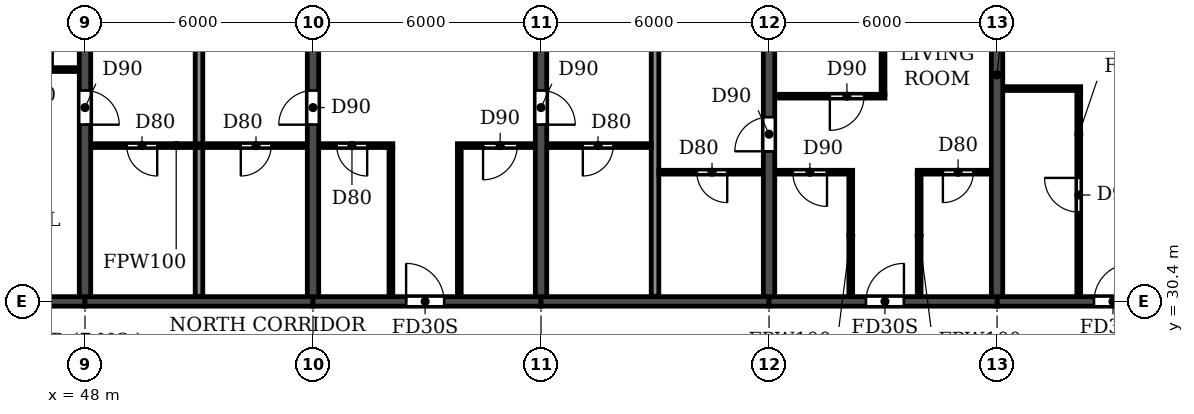
"""IFC4 building model, lengths in metres.
Left out: names, types, materials, properties, quantities, classifications, styles, units other than length and angle.
Written with IfcOpenShell. Run it as: python <this file> out.ifc"""

import sys

from ifc_helpers import new_model, si_unit, direction, frame, frame_2d, origin, place, context, subcontext, project, spatial, rectangle, extrude, element, fill, save


model = new_model("IFC4")
c1 = context("Model", 3, precision=1e-05, world=origin(), true_north=direction((0.0, 1.0)))
c2 = subcontext(c1, "Body", "Model", "MODEL_VIEW")
j1 = project(units=[si_unit("LENGTHUNIT", "METRE"), si_unit("PLANEANGLEUNIT", "RADIAN")], contexts=[c1])
p1 = place(None, origin())
s1 = spatial("IfcSite", under=j1, at=p1, CompositionType="ELEMENT")
p2 = place(p1, origin())
s2 = spatial("IfcBuilding", under=s1, at=p2, CompositionType="ELEMENT")
p3 = place(p2, frame((0.0, 0.0, 162.0)))
s3 = spatial("IfcBuildingStorey", under=s2, at=p3, CompositionType="ELEMENT", Elevation=162.0)
p4 = place(p3, frame((48.0, 30.525, 0.0), z_axis=(0.0, 0.0, 1.0), x_axis=(0.0, 1.0, 0.0)))
e1 = element("IfcWall", 1, at=p4, inside=s3, PredefinedType="SHEAR", context=c2, shape_type="SweptSolid", body=[
    extrude(rectangle(XDim=11.675, YDim=0.3, at=frame_2d((5.837, 0.0))), origin(), (0.0, 0.0, 1.0), 2.95),
])
p5 = place(p4, frame((4.525, 0.0, 0.0)))
e2 = element("IfcOpeningElement", 2, at=p5, cuts=e1, PredefinedType="OPENING", context=c2, shape_type="SweptSolid", body=[
    extrude(rectangle(XDim=0.9, YDim=2.1, at=frame_2d((0.45, 1.05))), frame((0.0, 0.16, 0.0), z_axis=(0.0, -1.0, 0.0), x_axis=(1.0, 0.0, 0.0)), (0.0, 0.0, 1.0), 0.32),
])
p6 = place(p3, frame((54.0, 30.525, 0.0), z_axis=(0.0, 0.0, 1.0), x_axis=(0.0, 1.0, 0.0)))
e3 = element("IfcWall", 3, at=p6, inside=s3, PredefinedType="SHEAR", context=c2, shape_type="SweptSolid", body=[
    extrude(rectangle(XDim=11.675, YDim=0.3, at=frame_2d((5.837, 0.0))), origin(), (0.0, 0.0, 1.0), 2.95),
])
p7 = place(p6, frame((4.525, 0.0, 0.0)))
e4 = element("IfcOpeningElement", 4, at=p7, cuts=e3, PredefinedType="OPENING", context=c2, shape_type="SweptSolid", body=[
    extrude(rectangle(XDim=0.9, YDim=2.1, at=frame_2d((0.45, 1.05))), frame((0.0, 0.16, 0.0), z_axis=(0.0, -1.0, 0.0), x_axis=(1.0, 0.0, 0.0)), (0.0, 0.0, 1.0), 0.32),
])
p8 = place(p3, frame((60.0, 30.525, 0.0), z_axis=(0.0, 0.0, 1.0), x_axis=(0.0, 1.0, 0.0)))
e5 = element("IfcWall", 5, at=p8, inside=s3, PredefinedType="SHEAR", context=c2, shape_type="SweptSolid", body=[
    extrude(rectangle(XDim=11.675, YDim=0.3, at=frame_2d((5.837, 0.0))), origin(), (0.0, 0.0, 1.0), 2.95),
])
p9 = place(p8, frame((4.525, 0.0, 0.0)))
e6 = element("IfcOpeningElement", 6, at=p9, cuts=e5, PredefinedType="OPENING", context=c2, shape_type="SweptSolid", body=[
    extrude(rectangle(XDim=0.9, YDim=2.1, at=frame_2d((0.45, 1.05))), frame((0.0, 0.16, 0.0), z_axis=(0.0, -1.0, 0.0), x_axis=(1.0, 0.0, 0.0)), (0.0, 0.0, 1.0), 0.32),
])
p10 = place(p3, frame((66.0, 30.525, 0.0), z_axis=(0.0, 0.0, 1.0), x_axis=(0.0, 1.0, 0.0)))
e7 = element("IfcWall", 7, at=p10, inside=s3, PredefinedType="SHEAR", context=c2, shape_type="SweptSolid", body=[
    extrude(rectangle(XDim=11.675, YDim=0.3, at=frame_2d((5.837, 0.0))), origin(), (0.0, 0.0, 1.0), 2.95),
])
p11 = place(p10, frame((3.825, 0.0, 0.0)))
e8 = element("IfcOpeningElement", 8, at=p11, cuts=e7, PredefinedType="OPENING", context=c2, shape_type="SweptSolid", body=[
    extrude(rectangle(XDim=0.9, YDim=2.1, at=frame_2d((0.45, 1.05))), frame((0.0, 0.16, 0.0), z_axis=(0.0, -1.0, 0.0), x_axis=(1.0, 0.0, 0.0)), (0.0, 0.0, 1.0), 0.32),
])
p12 = place(p3, frame((72.0, 30.525, 0.0), z_axis=(0.0, 0.0, 1.0), x_axis=(0.0, 1.0, 0.0)))
e9 = element("IfcWall", 9, at=p12, inside=s3, PredefinedType="SHEAR", context=c2, shape_type="SweptSolid", body=[
    extrude(rectangle(XDim=11.675, YDim=0.3, at=frame_2d((5.837, 0.0))), origin(), (0.0, 0.0, 1.0), 2.95),
])
for number, where, z_axis, x_axis in (
    (10, (42.0, 30.4, 0.0), (0.0, 0.0, 1.0), (1.0, 0.0, 0.0)),
    (11, (48.0, 30.4, 0.0), (0.0, 0.0, 1.0), (1.0, 0.0, 0.0)),
):
    element("IfcWall", number, at=place(p3, frame(where, z_axis=z_axis, x_axis=x_axis)), inside=s3, PredefinedType="SHEAR", context=c2, shape_type="SweptSolid", body=[
        extrude(rectangle(XDim=6.0, YDim=0.25, at=frame_2d((3.0, 0.0))), origin(), (0.0, 0.0, 1.0), 2.35),
    ])
p13 = place(p3, frame((54.0, 30.4, 0.0), z_axis=(0.0, 0.0, 1.0), x_axis=(1.0, 0.0, 0.0)))
e12 = element("IfcWall", 12, at=p13, inside=s3, PredefinedType="SHEAR", context=c2, shape_type="SweptSolid", body=[
    extrude(rectangle(XDim=6.0, YDim=0.25, at=frame_2d((3.0, 0.0))), origin(), (0.0, 0.0, 1.0), 2.35),
])
p14 = place(p13, frame((2.45, 0.0, 0.0)))
e13 = element("IfcOpeningElement", 13, at=p14, cuts=e12, PredefinedType="OPENING", context=c2, shape_type="SweptSolid", body=[
    extrude(rectangle(XDim=1.0, YDim=2.1, at=frame_2d((0.5, 1.05))), frame((0.0, 0.135, 0.0), z_axis=(0.0, -1.0, 0.0), x_axis=(1.0, 0.0, 0.0)), (0.0, 0.0, 1.0), 0.27),
])
p15 = place(p3, frame((60.0, 30.4, 0.0), z_axis=(0.0, 0.0, 1.0), x_axis=(1.0, 0.0, 0.0)))
e14 = element("IfcWall", 14, at=p15, inside=s3, PredefinedType="SHEAR", context=c2, shape_type="SweptSolid", body=[
    extrude(rectangle(XDim=6.0, YDim=0.25, at=frame_2d((3.0, 0.0))), origin(), (0.0, 0.0, 1.0), 2.35),
])
p16 = place(p3, frame((66.0, 30.4, 0.0), z_axis=(0.0, 0.0, 1.0), x_axis=(1.0, 0.0, 0.0)))
e15 = element("IfcWall", 15, at=p16, inside=s3, PredefinedType="SHEAR", context=c2, shape_type="SweptSolid", body=[
    extrude(rectangle(XDim=6.0, YDim=0.25, at=frame_2d((3.0, 0.0))), origin(), (0.0, 0.0, 1.0), 2.35),
])
p17 = place(p16, frame((2.55, 0.0, 0.0)))
e16 = element("IfcOpeningElement", 16, at=p17, cuts=e15, PredefinedType="OPENING", context=c2, shape_type="SweptSolid", body=[
    extrude(rectangle(XDim=1.0, YDim=2.1, at=frame_2d((0.5, 1.05))), frame((0.0, 0.135, 0.0), z_axis=(0.0, -1.0, 0.0), x_axis=(1.0, 0.0, 0.0)), (0.0, 0.0, 1.0), 0.27),
])
p18 = place(p3, frame((72.0, 30.4, 0.0), z_axis=(0.0, 0.0, 1.0), x_axis=(1.0, 0.0, 0.0)))
e17 = element("IfcWall", 17, at=p18, inside=s3, PredefinedType="SHEAR", context=c2, shape_type="SweptSolid", body=[
    extrude(rectangle(XDim=6.0, YDim=0.25, at=frame_2d((3.0, 0.0))), origin(), (0.0, 0.0, 1.0), 2.35),
])
p19 = place(p18, frame((2.55, 0.0, 0.0)))
e18 = element("IfcOpeningElement", 18, at=p19, cuts=e17, PredefinedType="OPENING", context=c2, shape_type="SweptSolid", body=[
    extrude(rectangle(XDim=1.0, YDim=2.1, at=frame_2d((0.5, 1.05))), frame((0.0, 0.135, 0.0), z_axis=(0.0, -1.0, 0.0), x_axis=(1.0, 0.0, 0.0)), (0.0, 0.0, 1.0), 0.27),
])
for number, where, z_axis, x_axis in (
    (19, (51.0, 30.535, 0.0), (0.0, 0.0, 1.0), (0.0, 1.0, 0.0)),
    (20, (63.0, 30.535, 0.0), (0.0, 0.0, 1.0), (0.0, 1.0, 0.0)),
):
    element("IfcWall", number, at=place(p3, frame(where, z_axis=z_axis, x_axis=x_axis)), inside=s3, PredefinedType="PARTITIONING", context=c2, shape_type="SweptSolid", body=[
        extrude(rectangle(XDim=11.805, YDim=0.2, at=frame_2d((5.903, 0.0))), origin(), (0.0, 0.0, 1.0), 2.95),
    ])
p20 = place(p3, frame((63.1, 33.8, 0.0), z_axis=(0.0, 0.0, 1.0), x_axis=(1.0, 0.0, 0.0)))
e21 = element("IfcWall", 21, at=p20, inside=s3, PredefinedType="PARTITIONING", context=c2, shape_type="SweptSolid", body=[
    extrude(rectangle(XDim=2.74, YDim=0.1, at=frame_2d((1.37, 0.0))), origin(), (0.0, 0.0, 1.0), 2.95),
])
p21 = place(p20, frame((1.0, 0.0, 0.0)))
e22 = element("IfcOpeningElement", 22, at=p21, cuts=e21, PredefinedType="OPENING", context=c2, shape_type="SweptSolid", body=[
    extrude(rectangle(XDim=0.8, YDim=2.1, at=frame_2d((0.4, 1.05))), frame((0.0, 0.06, 0.0), z_axis=(0.0, -1.0, 0.0), x_axis=(1.0, 0.0, 0.0)), (0.0, 0.0, 1.0), 0.12),
])
p22 = place(p3, frame((66.16, 33.8, 0.0), z_axis=(0.0, 0.0, 1.0), x_axis=(1.0, 0.0, 0.0)))
e23 = element("IfcWall", 23, at=p22, inside=s3, PredefinedType="PARTITIONING", context=c2, shape_type="SweptSolid", body=[
    extrude(rectangle(XDim=2.04, YDim=0.1, at=frame_2d((1.02, 0.0))), origin(), (0.0, 0.0, 1.0), 2.95),
])
p23 = place(p22, frame((0.465, 0.0, 0.0)))
e24 = element("IfcOpeningElement", 24, at=p23, cuts=e23, PredefinedType="OPENING", context=c2, shape_type="SweptSolid", body=[
    extrude(rectangle(XDim=0.9, YDim=2.1, at=frame_2d((0.45, 1.05))), frame((0.0, 0.06, 0.0), z_axis=(0.0, -1.0, 0.0), x_axis=(1.0, 0.0, 0.0)), (0.0, 0.0, 1.0), 0.12),
])
p24 = place(p3, frame((69.9, 33.8, 0.0), z_axis=(0.0, 0.0, 1.0), x_axis=(1.0, 0.0, 0.0)))
e25 = element("IfcWall", 25, at=p24, inside=s3, PredefinedType="PARTITIONING", context=c2, shape_type="SweptSolid", body=[
    extrude(rectangle(XDim=1.94, YDim=0.1, at=frame_2d((0.97, 0.0))), origin(), (0.0, 0.0, 1.0), 2.95),
])
p25 = place(p24, frame((0.675, 0.0, 0.0)))
e26 = element("IfcOpeningElement", 26, at=p25, cuts=e25, PredefinedType="OPENING", context=c2, shape_type="SweptSolid", body=[
    extrude(rectangle(XDim=0.8, YDim=2.1, at=frame_2d((0.4, 1.05))), frame((0.0, 0.06, 0.0), z_axis=(0.0, -1.0, 0.0), x_axis=(1.0, 0.0, 0.0)), (0.0, 0.0, 1.0), 0.12),
])
p26 = place(p3, frame((48.16, 34.5, 0.0), z_axis=(0.0, 0.0, 1.0), x_axis=(1.0, 0.0, 0.0)))
e27 = element("IfcWall", 27, at=p26, inside=s3, PredefinedType="PARTITIONING", context=c2, shape_type="SweptSolid", body=[
    extrude(rectangle(XDim=5.68, YDim=0.1, at=frame_2d((2.84, 0.0))), origin(), (0.0, 0.0, 1.0), 2.95),
])
p27 = place(p26, frame((0.94, 0.0, 0.0)))
e28 = element("IfcOpeningElement", 28, at=p27, cuts=e27, PredefinedType="OPENING", context=c2, shape_type="SweptSolid", body=[
    extrude(rectangle(XDim=0.8, YDim=2.1, at=frame_2d((0.4, 1.05))), frame((0.0, 0.06, 0.0), z_axis=(0.0, -1.0, 0.0), x_axis=(1.0, 0.0, 0.0)), (0.0, 0.0, 1.0), 0.12),
])
p28 = place(p26, frame((3.94, 0.0, 0.0)))
e29 = element("IfcOpeningElement", 29, at=p28, cuts=e27, PredefinedType="OPENING", context=c2, shape_type="SweptSolid", body=[
    extrude(rectangle(XDim=0.8, YDim=2.1, at=frame_2d((0.4, 1.05))), frame((0.0, 0.06, 0.0), z_axis=(0.0, -1.0, 0.0), x_axis=(1.0, 0.0, 0.0)), (0.0, 0.0, 1.0), 0.12),
])
p29 = place(p3, frame((54.16, 34.5, 0.0), z_axis=(0.0, 0.0, 1.0), x_axis=(1.0, 0.0, 0.0)))
e30 = element("IfcWall", 30, at=p29, inside=s3, PredefinedType="PARTITIONING", context=c2, shape_type="SweptSolid", body=[
    extrude(rectangle(XDim=1.94, YDim=0.1, at=frame_2d((0.97, 0.0))), origin(), (0.0, 0.0, 1.0), 2.95),
])
p30 = place(p29, frame((0.465, 0.0, 0.0)))
e31 = element("IfcOpeningElement", 31, at=p30, cuts=e30, PredefinedType="OPENING", context=c2, shape_type="SweptSolid", body=[
    extrude(rectangle(XDim=0.8, YDim=2.1, at=frame_2d((0.4, 1.05))), frame((0.0, 0.06, 0.0), z_axis=(0.0, -1.0, 0.0), x_axis=(1.0, 0.0, 0.0)), (0.0, 0.0, 1.0), 0.12),
])
p31 = place(p3, frame((57.8, 34.5, 0.0), z_axis=(0.0, 0.0, 1.0), x_axis=(1.0, 0.0, 0.0)))
e32 = element("IfcWall", 32, at=p31, inside=s3, PredefinedType="PARTITIONING", context=c2, shape_type="SweptSolid", body=[
    extrude(rectangle(XDim=2.04, YDim=0.1, at=frame_2d((1.02, 0.0))), origin(), (0.0, 0.0, 1.0), 2.95),
])
p32 = place(p31, frame((0.675, 0.0, 0.0)))
e33 = element("IfcOpeningElement", 33, at=p32, cuts=e32, PredefinedType="OPENING", context=c2, shape_type="SweptSolid", body=[
    extrude(rectangle(XDim=0.9, YDim=2.1, at=frame_2d((0.45, 1.05))), frame((0.0, 0.06, 0.0), z_axis=(0.0, -1.0, 0.0), x_axis=(1.0, 0.0, 0.0)), (0.0, 0.0, 1.0), 0.12),
])
p33 = place(p3, frame((60.16, 34.5, 0.0), z_axis=(0.0, 0.0, 1.0), x_axis=(1.0, 0.0, 0.0)))
e34 = element("IfcWall", 34, at=p33, inside=s3, PredefinedType="PARTITIONING", context=c2, shape_type="SweptSolid", body=[
    extrude(rectangle(XDim=2.74, YDim=0.1, at=frame_2d((1.37, 0.0))), origin(), (0.0, 0.0, 1.0), 2.95),
])
p34 = place(p33, frame((0.94, 0.0, 0.0)))
e35 = element("IfcOpeningElement", 35, at=p34, cuts=e34, PredefinedType="OPENING", context=c2, shape_type="SweptSolid", body=[
    extrude(rectangle(XDim=0.8, YDim=2.1, at=frame_2d((0.4, 1.05))), frame((0.0, 0.06, 0.0), z_axis=(0.0, -1.0, 0.0), x_axis=(1.0, 0.0, 0.0)), (0.0, 0.0, 1.0), 0.12),
])
p35 = place(p3, frame((66.16, 35.8, 0.0), z_axis=(0.0, 0.0, 1.0), x_axis=(1.0, 0.0, 0.0)))
e36 = element("IfcWall", 36, at=p35, inside=s3, PredefinedType="PARTITIONING", context=c2, shape_type="SweptSolid", body=[
    extrude(rectangle(XDim=2.89, YDim=0.1, at=frame_2d((1.445, 0.0))), origin(), (0.0, 0.0, 1.0), 2.95),
])
p36 = place(p35, frame((1.44, 0.0, 0.0)))
e37 = element("IfcOpeningElement", 37, at=p36, cuts=e36, PredefinedType="OPENING", context=c2, shape_type="SweptSolid", body=[
    extrude(rectangle(XDim=0.9, YDim=2.1, at=frame_2d((0.45, 1.05))), frame((0.0, 0.06, 0.0), z_axis=(0.0, -1.0, 0.0), x_axis=(1.0, 0.0, 0.0)), (0.0, 0.0, 1.0), 0.12),
])
p37 = place(p3, frame((72.16, 36.0, 0.0), z_axis=(0.0, 0.0, 1.0), x_axis=(1.0, 0.0, 0.0)))
e38 = element("IfcWall", 38, at=p37, inside=s3, PredefinedType="PARTITIONING", context=c2, shape_type="SweptSolid", body=[
    extrude(rectangle(XDim=2.04, YDim=0.1, at=frame_2d((1.02, 0.0))), origin(), (0.0, 0.0, 1.0), 2.95),
])
p38 = place(p3, frame((42.16, 36.5, 0.0), z_axis=(0.0, 0.0, 1.0), x_axis=(1.0, 0.0, 0.0)))
e39 = element("IfcWall", 39, at=p38, inside=s3, PredefinedType="PARTITIONING", context=c2, shape_type="SweptSolid", body=[
    extrude(rectangle(XDim=5.68, YDim=0.1, at=frame_2d((2.84, 0.0))), origin(), (0.0, 0.0, 1.0), 2.95),
])
p39 = place(p38, frame((4.09, 0.0, 0.0)))
e40 = element("IfcOpeningElement", 40, at=p39, cuts=e39, PredefinedType="OPENING", context=c2, shape_type="SweptSolid", body=[
    extrude(rectangle(XDim=0.9, YDim=2.1, at=frame_2d((0.45, 1.05))), frame((0.0, 0.06, 0.0), z_axis=(0.0, -1.0, 0.0), x_axis=(1.0, 0.0, 0.0)), (0.0, 0.0, 1.0), 0.12),
])
for number, where, z_axis, x_axis in (
    (41, (56.05, 30.535, 0.0), (0.0, 0.0, 1.0), (0.0, 1.0, 0.0)),
    (42, (57.85, 30.535, 0.0), (0.0, 0.0, 1.0), (0.0, 1.0, 0.0)),
):
    element("IfcWall", number, at=place(p3, frame(where, z_axis=z_axis, x_axis=x_axis)), inside=s3, PredefinedType="PARTITIONING", context=c2, shape_type="SweptSolid", body=[
        extrude(rectangle(XDim=3.915, YDim=0.1, at=frame_2d((1.958, 0.0))), origin(), (0.0, 0.0, 1.0), 2.95),
    ])
p40 = place(p3, frame((68.15, 30.535, 0.0), z_axis=(0.0, 0.0, 1.0), x_axis=(0.0, 1.0, 0.0)))
e43 = element("IfcWall", 43, at=p40, inside=s3, PredefinedType="PARTITIONING", context=c2, shape_type="SweptSolid", body=[
    extrude(rectangle(XDim=3.215, YDim=0.1, at=frame_2d((1.607, 0.0))), origin(), (0.0, 0.0, 1.0), 2.95),
])
p41 = place(p3, frame((69.0, 35.85, 0.0), z_axis=(0.0, 0.0, 1.0), x_axis=(0.0, 1.0, 0.0)))
e44 = element("IfcWall", 44, at=p41, inside=s3, PredefinedType="PARTITIONING", context=c2, shape_type="SweptSolid", body=[
    extrude(rectangle(XDim=6.49, YDim=0.1, at=frame_2d((3.245, 0.0))), origin(), (0.0, 0.0, 1.0), 2.95),
])
p42 = place(p3, frame((69.95, 30.535, 0.0), z_axis=(0.0, 0.0, 1.0), x_axis=(0.0, 1.0, 0.0)))
e45 = element("IfcWall", 45, at=p42, inside=s3, PredefinedType="PARTITIONING", context=c2, shape_type="SweptSolid", body=[
    extrude(rectangle(XDim=3.215, YDim=0.1, at=frame_2d((1.607, 0.0))), origin(), (0.0, 0.0, 1.0), 2.95),
])
p43 = place(p3, frame((74.15, 30.535, 0.0), z_axis=(0.0, 0.0, 1.0), x_axis=(0.0, 1.0, 0.0)))
e46 = element("IfcWall", 46, at=p43, inside=s3, PredefinedType="PARTITIONING", context=c2, shape_type="SweptSolid", body=[
    extrude(rectangle(XDim=5.415, YDim=0.1, at=frame_2d((2.708, 0.0))), origin(), (0.0, 0.0, 1.0), 2.95),
])
p44 = place(p43, frame((2.215, 0.0, 0.0)))
e47 = element("IfcOpeningElement", 47, at=p44, cuts=e46, PredefinedType="OPENING", context=c2, shape_type="SweptSolid", body=[
    extrude(rectangle(XDim=0.9, YDim=2.1, at=frame_2d((0.45, 1.05))), frame((0.0, 0.06, 0.0), z_axis=(0.0, -1.0, 0.0), x_axis=(1.0, 0.0, 0.0)), (0.0, 0.0, 1.0), 0.12),
])
p45 = place(p27, frame((0.8, 0.0, 0.0), z_axis=(0.0, 0.0, 1.0), x_axis=(-1.0, 0.0, 0.0)))
e48 = element("IfcDoor", 48, at=p45, inside=s3, OperationType="SINGLE_SWING_LEFT", PredefinedType="DOOR", context=c2, shape_type="SweptSolid", body=[
    extrude(rectangle(XDim=0.8, YDim=2.1, at=frame_2d((0.4, 1.05))), frame((0.0, 0.025, 0.0), z_axis=(0.0, -1.0, 0.0), x_axis=(1.0, 0.0, 0.0)), (0.0, 0.0, 1.0), 0.05),
])
fill(e28, e48)
p46 = place(p5, frame((0.9, 0.0, 0.0), z_axis=(0.0, 0.0, 1.0), x_axis=(-1.0, 0.0, 0.0)))
e49 = element("IfcDoor", 49, at=p46, inside=s3, OperationType="SINGLE_SWING_RIGHT", PredefinedType="DOOR", context=c2, shape_type="SweptSolid", body=[
    extrude(rectangle(XDim=0.9, YDim=2.1, at=frame_2d((0.45, 1.05))), frame((0.0, 0.025, 0.0), z_axis=(0.0, -1.0, 0.0), x_axis=(1.0, 0.0, 0.0)), (0.0, 0.0, 1.0), 0.05),
])
fill(e2, e49)
p47 = place(p28, frame((0.8, 0.0, 0.0), z_axis=(0.0, 0.0, 1.0), x_axis=(-1.0, 0.0, 0.0)))
e50 = element("IfcDoor", 50, at=p47, inside=s3, OperationType="SINGLE_SWING_RIGHT", PredefinedType="DOOR", context=c2, shape_type="SweptSolid", body=[
    extrude(rectangle(XDim=0.8, YDim=2.1, at=frame_2d((0.4, 1.05))), frame((0.0, 0.025, 0.0), z_axis=(0.0, -1.0, 0.0), x_axis=(1.0, 0.0, 0.0)), (0.0, 0.0, 1.0), 0.05),
])
fill(e29, e50)
p48 = place(p34, frame((0.8, 0.0, 0.0), z_axis=(0.0, 0.0, 1.0), x_axis=(-1.0, 0.0, 0.0)))
e51 = element("IfcDoor", 51, at=p48, inside=s3, OperationType="SINGLE_SWING_RIGHT", PredefinedType="DOOR", context=c2, shape_type="SweptSolid", body=[
    extrude(rectangle(XDim=0.8, YDim=2.1, at=frame_2d((0.4, 1.05))), frame((0.0, 0.025, 0.0), z_axis=(0.0, -1.0, 0.0), x_axis=(1.0, 0.0, 0.0)), (0.0, 0.0, 1.0), 0.05),
])
fill(e35, e51)
p49 = place(p7, origin())
e52 = element("IfcDoor", 52, at=p49, inside=s3, OperationType="SINGLE_SWING_LEFT", PredefinedType="DOOR", context=c2, shape_type="SweptSolid", body=[
    extrude(rectangle(XDim=0.9, YDim=2.1, at=frame_2d((0.45, 1.05))), frame((0.0, 0.025, 0.0), z_axis=(0.0, -1.0, 0.0), x_axis=(1.0, 0.0, 0.0)), (0.0, 0.0, 1.0), 0.05),
])
fill(e4, e52)
p50 = place(p30, frame((0.8, 0.0, 0.0), z_axis=(0.0, 0.0, 1.0), x_axis=(-1.0, 0.0, 0.0)))
e53 = element("IfcDoor", 53, at=p50, inside=s3, OperationType="SINGLE_SWING_LEFT", PredefinedType="DOOR", context=c2, shape_type="SweptSolid", body=[
    extrude(rectangle(XDim=0.8, YDim=2.1, at=frame_2d((0.4, 1.05))), frame((0.0, 0.025, 0.0), z_axis=(0.0, -1.0, 0.0), x_axis=(1.0, 0.0, 0.0)), (0.0, 0.0, 1.0), 0.05),
])
fill(e31, e53)
p51 = place(p14, origin())
e54 = element("IfcDoor", 54, at=p51, inside=s3, OperationType="SINGLE_SWING_LEFT", PredefinedType="DOOR", context=c2, shape_type="SweptSolid", body=[
    extrude(rectangle(XDim=1.0, YDim=2.1, at=frame_2d((0.5, 1.05))), frame((0.0, 0.025, 0.0), z_axis=(0.0, -1.0, 0.0), x_axis=(1.0, 0.0, 0.0)), (0.0, 0.0, 1.0), 0.05),
])
fill(e13, e54)
p52 = place(p32, frame((0.9, 0.0, 0.0), z_axis=(0.0, 0.0, 1.0), x_axis=(-1.0, 0.0, 0.0)))
e55 = element("IfcDoor", 55, at=p52, inside=s3, OperationType="SINGLE_SWING_RIGHT", PredefinedType="DOOR", context=c2, shape_type="SweptSolid", body=[
    extrude(rectangle(XDim=0.9, YDim=2.1, at=frame_2d((0.45, 1.05))), frame((0.0, 0.025, 0.0), z_axis=(0.0, -1.0, 0.0), x_axis=(1.0, 0.0, 0.0)), (0.0, 0.0, 1.0), 0.05),
])
fill(e33, e55)
p53 = place(p9, frame((0.9, 0.0, 0.0), z_axis=(0.0, 0.0, 1.0), x_axis=(-1.0, 0.0, 0.0)))
e56 = element("IfcDoor", 56, at=p53, inside=s3, OperationType="SINGLE_SWING_RIGHT", PredefinedType="DOOR", context=c2, shape_type="SweptSolid", body=[
    extrude(rectangle(XDim=0.9, YDim=2.1, at=frame_2d((0.45, 1.05))), frame((0.0, 0.025, 0.0), z_axis=(0.0, -1.0, 0.0), x_axis=(1.0, 0.0, 0.0)), (0.0, 0.0, 1.0), 0.05),
])
fill(e6, e56)
p54 = place(p21, frame((0.8, 0.0, 0.0), z_axis=(0.0, 0.0, 1.0), x_axis=(-1.0, 0.0, 0.0)))
e57 = element("IfcDoor", 57, at=p54, inside=s3, OperationType="SINGLE_SWING_LEFT", PredefinedType="DOOR", context=c2, shape_type="SweptSolid", body=[
    extrude(rectangle(XDim=0.8, YDim=2.1, at=frame_2d((0.4, 1.05))), frame((0.0, 0.025, 0.0), z_axis=(0.0, -1.0, 0.0), x_axis=(1.0, 0.0, 0.0)), (0.0, 0.0, 1.0), 0.05),
])
fill(e22, e57)
p55 = place(p11, origin())
e58 = element("IfcDoor", 58, at=p55, inside=s3, OperationType="SINGLE_SWING_LEFT", PredefinedType="DOOR", context=c2, shape_type="SweptSolid", body=[
    extrude(rectangle(XDim=0.9, YDim=2.1, at=frame_2d((0.45, 1.05))), frame((0.0, 0.025, 0.0), z_axis=(0.0, -1.0, 0.0), x_axis=(1.0, 0.0, 0.0)), (0.0, 0.0, 1.0), 0.05),
])
fill(e8, e58)
p56 = place(p23, frame((0.9, 0.0, 0.0), z_axis=(0.0, 0.0, 1.0), x_axis=(-1.0, 0.0, 0.0)))
e59 = element("IfcDoor", 59, at=p56, inside=s3, OperationType="SINGLE_SWING_LEFT", PredefinedType="DOOR", context=c2, shape_type="SweptSolid", body=[
    extrude(rectangle(XDim=0.9, YDim=2.1, at=frame_2d((0.45, 1.05))), frame((0.0, 0.025, 0.0), z_axis=(0.0, -1.0, 0.0), x_axis=(1.0, 0.0, 0.0)), (0.0, 0.0, 1.0), 0.05),
])
fill(e24, e59)
p57 = place(p36, frame((0.9, 0.0, 0.0), z_axis=(0.0, 0.0, 1.0), x_axis=(-1.0, 0.0, 0.0)))
e60 = element("IfcDoor", 60, at=p57, inside=s3, OperationType="SINGLE_SWING_RIGHT", PredefinedType="DOOR", context=c2, shape_type="SweptSolid", body=[
    extrude(rectangle(XDim=0.9, YDim=2.1, at=frame_2d((0.45, 1.05))), frame((0.0, 0.025, 0.0), z_axis=(0.0, -1.0, 0.0), x_axis=(1.0, 0.0, 0.0)), (0.0, 0.0, 1.0), 0.05),
])
fill(e37, e60)
p58 = place(p17, origin())
e61 = element("IfcDoor", 61, at=p58, inside=s3, OperationType="SINGLE_SWING_RIGHT", PredefinedType="DOOR", context=c2, shape_type="SweptSolid", body=[
    extrude(rectangle(XDim=1.0, YDim=2.1, at=frame_2d((0.5, 1.05))), frame((0.0, 0.025, 0.0), z_axis=(0.0, -1.0, 0.0), x_axis=(1.0, 0.0, 0.0)), (0.0, 0.0, 1.0), 0.05),
])
fill(e16, e61)
p59 = place(p25, frame((0.8, 0.0, 0.0), z_axis=(0.0, 0.0, 1.0), x_axis=(-1.0, 0.0, 0.0)))
e62 = element("IfcDoor", 62, at=p59, inside=s3, OperationType="SINGLE_SWING_RIGHT", PredefinedType="DOOR", context=c2, shape_type="SweptSolid", body=[
    extrude(rectangle(XDim=0.8, YDim=2.1, at=frame_2d((0.4, 1.05))), frame((0.0, 0.025, 0.0), z_axis=(0.0, -1.0, 0.0), x_axis=(1.0, 0.0, 0.0)), (0.0, 0.0, 1.0), 0.05),
])
fill(e26, e62)
p60 = place(p44, origin())
e63 = element("IfcDoor", 63, at=p60, inside=s3, OperationType="SINGLE_SWING_RIGHT", PredefinedType="DOOR", context=c2, shape_type="SweptSolid", body=[
    extrude(rectangle(XDim=0.9, YDim=2.1, at=frame_2d((0.45, 1.05))), frame((0.0, 0.025, 0.0), z_axis=(0.0, -1.0, 0.0), x_axis=(1.0, 0.0, 0.0)), (0.0, 0.0, 1.0), 0.05),
])
fill(e47, e63)
p61 = place(p19, origin())
e64 = element("IfcDoor", 64, at=p61, inside=s3, OperationType="SINGLE_SWING_RIGHT", PredefinedType="DOOR", context=c2, shape_type="SweptSolid", body=[
    extrude(rectangle(XDim=1.0, YDim=2.1, at=frame_2d((0.5, 1.05))), frame((0.0, 0.025, 0.0), z_axis=(0.0, -1.0, 0.0), x_axis=(1.0, 0.0, 0.0)), (0.0, 0.0, 1.0), 0.05),
])
fill(e18, e64)
save(model, sys.argv[1])
